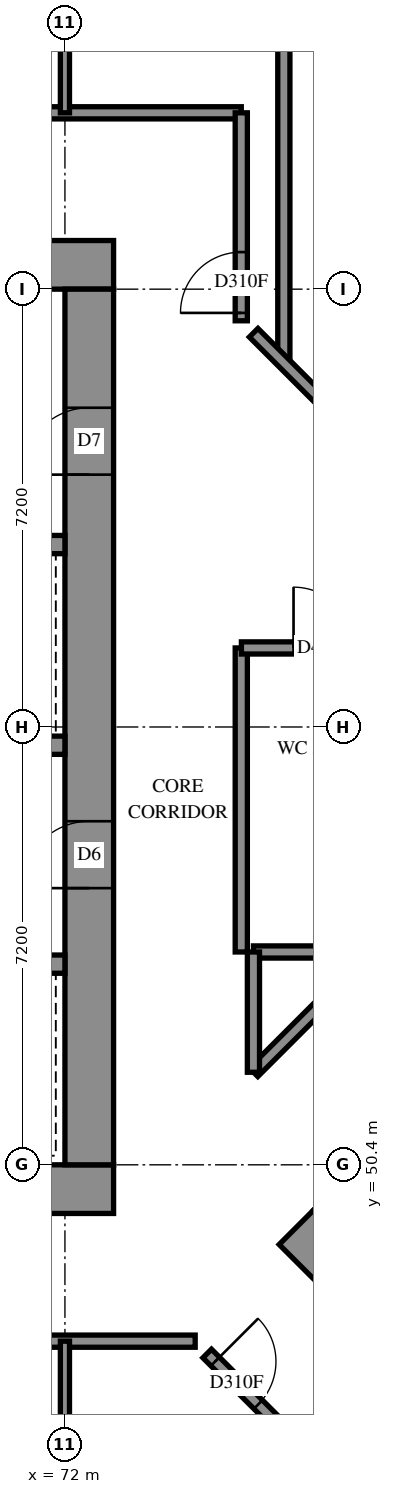
"""IFC4 building model, lengths in metres.
Left out: names, types, materials, properties, quantities, classifications, styles, units other than length and angle.
Written with IfcOpenShell. Run it as: python <this file> out.ifc"""

import sys

from ifc_helpers import new_model, si_unit, direction, frame, frame_2d, origin, place, context, subcontext, project, spatial, rectangle, extrude, element, fill, save


model = new_model("IFC4")
c1 = context("Model", 3, precision=1e-05, world=origin(), true_north=direction((0.0, 1.0)))
c2 = subcontext(c1, "Body", "Model", "MODEL_VIEW")
j1 = project(units=[si_unit("LENGTHUNIT", "METRE"), si_unit("PLANEANGLEUNIT", "RADIAN")], contexts=[c1])
p1 = place(None, origin())
s1 = spatial("IfcSite", under=j1, at=p1, CompositionType="ELEMENT")
p2 = place(p1, origin())
s2 = spatial("IfcBuilding", under=s1, at=p2, CompositionType="ELEMENT")
p3 = place(p2, frame((0.0, 0.0, 111.8)))
s3 = spatial("IfcBuildingStorey", under=s2, at=p3, CompositionType="ELEMENT", Elevation=111.8)
p4 = place(p3, frame((56.8, 50.0, -0.3), z_axis=(0.0, 0.0, 1.0), x_axis=(1.0, 0.0, 0.0)))
e1 = element("IfcWall", 1, at=p4, inside=s3, PredefinedType="SHEAR", context=c2, shape_type="SweptSolid", body=[
    extrude(rectangle(XDim=16.0, YDim=0.8, at=frame_2d((8.0, 0.0))), origin(), (0.0, 0.0, 1.0), 2.7),
])
p5 = place(p3, frame((56.8, 65.2, -0.3), z_axis=(0.0, 0.0, 1.0), x_axis=(1.0, 0.0, 0.0)))
e2 = element("IfcWall", 2, at=p5, inside=s3, PredefinedType="SHEAR", context=c2, shape_type="SweptSolid", body=[
    extrude(rectangle(XDim=16.0, YDim=0.8, at=frame_2d((8.0, 0.0))), origin(), (0.0, 0.0, 1.0), 2.7),
])
p6 = place(p5, frame((10.8, 0.0, 0.3)))
e3 = element("IfcOpeningElement", 3, at=p6, cuts=e2, PredefinedType="OPENING", context=c2, shape_type="SweptSolid", body=[
    extrude(rectangle(XDim=0.8, YDim=2.1, at=frame_2d((0.4, 1.05))), frame((0.0, 0.41, 0.0), z_axis=(0.0, -1.0, 0.0), x_axis=(1.0, 0.0, 0.0)), (0.0, 0.0, 1.0), 0.82),
])
p7 = place(p3, frame((72.4, 50.4, -0.3), z_axis=(0.0, 0.0, 1.0), x_axis=(0.0, 1.0, 0.0)))
e4 = element("IfcWall", 4, at=p7, inside=s3, PredefinedType="SHEAR", context=c2, shape_type="SweptSolid", body=[
    extrude(rectangle(XDim=14.4, YDim=0.8, at=frame_2d((7.2, 0.0))), origin(), (0.0, 0.0, 1.0), 2.7),
])
p8 = place(p7, frame((4.55, 0.0, 0.3)))
e5 = element("IfcOpeningElement", 5, at=p8, cuts=e4, PredefinedType="OPENING", context=c2, shape_type="SweptSolid", body=[
    extrude(rectangle(XDim=1.1, YDim=2.1, at=frame_2d((0.55, 1.05))), frame((0.0, 0.41, 0.0), z_axis=(0.0, -1.0, 0.0), x_axis=(1.0, 0.0, 0.0)), (0.0, 0.0, 1.0), 0.82),
])
p9 = place(p7, frame((11.35, 0.0, 0.3)))
e6 = element("IfcOpeningElement", 6, at=p9, cuts=e4, PredefinedType="OPENING", context=c2, shape_type="SweptSolid", body=[
    extrude(rectangle(XDim=1.1, YDim=2.1, at=frame_2d((0.55, 1.05))), frame((0.0, 0.41, 0.0), z_axis=(0.0, -1.0, 0.0), x_axis=(1.0, 0.0, 0.0)), (0.0, 0.0, 1.0), 0.82),
])
p10 = place(p3, frame((57.6, 53.7, 0.0), z_axis=(0.0, 0.0, 1.0), x_axis=(1.0, 0.0, 0.0)))
e7 = element("IfcWall", 7, at=p10, inside=s3, PredefinedType="SOLIDWALL", context=c2, shape_type="SweptSolid", body=[
    extrude(rectangle(XDim=14.4, YDim=0.3, at=frame_2d((7.2, 0.0))), origin(), (0.0, 0.0, 1.0), 3.1),
])
p11 = place(p10, frame((1.25, 0.0, 0.0)))
e8 = element("IfcOpeningElement", 8, at=p11, cuts=e7, PredefinedType="OPENING", context=c2, shape_type="SweptSolid", body=[
    extrude(rectangle(XDim=1.1, YDim=2.1, at=frame_2d((0.55, 1.05))), frame((0.0, 0.16, 0.0), z_axis=(0.0, -1.0, 0.0), x_axis=(1.0, 0.0, 0.0)), (0.0, 0.0, 1.0), 0.32),
])
p12 = place(p10, frame((4.85, 0.0, 0.0)))
e9 = element("IfcOpeningElement", 9, at=p12, cuts=e7, PredefinedType="OPENING", context=c2, shape_type="SweptSolid", body=[
    extrude(rectangle(XDim=1.1, YDim=2.1, at=frame_2d((0.55, 1.05))), frame((0.0, 0.16, 0.0), z_axis=(0.0, -1.0, 0.0), x_axis=(1.0, 0.0, 0.0)), (0.0, 0.0, 1.0), 0.32),
])
p13 = place(p10, frame((8.45, 0.0, 0.0)))
e10 = element("IfcOpeningElement", 10, at=p13, cuts=e7, PredefinedType="OPENING", context=c2, shape_type="SweptSolid", body=[
    extrude(rectangle(XDim=1.1, YDim=2.1, at=frame_2d((0.55, 1.05))), frame((0.0, 0.16, 0.0), z_axis=(0.0, -1.0, 0.0), x_axis=(1.0, 0.0, 0.0)), (0.0, 0.0, 1.0), 0.32),
])
p14 = place(p10, frame((12.05, 0.0, 0.0)))
e11 = element("IfcOpeningElement", 11, at=p14, cuts=e7, PredefinedType="OPENING", context=c2, shape_type="SweptSolid", body=[
    extrude(rectangle(XDim=1.1, YDim=2.1, at=frame_2d((0.55, 1.05))), frame((0.0, 0.16, 0.0), z_axis=(0.0, -1.0, 0.0), x_axis=(1.0, 0.0, 0.0)), (0.0, 0.0, 1.0), 0.32),
])
p15 = place(p3, frame((57.6, 57.3, 0.0), z_axis=(0.0, 0.0, 1.0), x_axis=(1.0, 0.0, 0.0)))
e12 = element("IfcWall", 12, at=p15, inside=s3, PredefinedType="SOLIDWALL", context=c2, shape_type="SweptSolid", body=[
    extrude(rectangle(XDim=14.4, YDim=0.3, at=frame_2d((7.2, 0.0))), origin(), (0.0, 0.0, 1.0), 3.1),
])
p16 = place(p15, frame((12.05, 0.0, 0.0)))
e13 = element("IfcOpeningElement", 13, at=p16, cuts=e12, PredefinedType="OPENING", context=c2, shape_type="SweptSolid", body=[
    extrude(rectangle(XDim=1.1, YDim=2.1, at=frame_2d((0.55, 1.05))), frame((0.0, 0.16, 0.0), z_axis=(0.0, -1.0, 0.0), x_axis=(1.0, 0.0, 0.0)), (0.0, 0.0, 1.0), 0.32),
])
p17 = place(p3, frame((64.8, 60.6, 0.0), z_axis=(0.0, 0.0, 1.0), x_axis=(1.0, 0.0, 0.0)))
e14 = element("IfcWall", 14, at=p17, inside=s3, PredefinedType="SOLIDWALL", context=c2, shape_type="SweptSolid", body=[
    extrude(rectangle(XDim=7.2, YDim=0.3, at=frame_2d((3.6, 0.0))), origin(), (0.0, 0.0, 1.0), 3.1),
])
p18 = place(p3, frame((75.806, 49.373, -0.3), z_axis=(0.0, 0.0, 1.0), x_axis=(0.7071067812, -0.7071067812, 0.0)))
e15 = element("IfcWall", 15, at=p18, inside=s3, PredefinedType="SHEAR", context=c2, shape_type="SweptSolid", body=[
    extrude(rectangle(XDim=16.0, YDim=0.8, at=frame_2d((8.0, 0.0))), origin(), (0.0, 0.0, 1.0), 2.7),
])
p19 = place(p3, frame((76.372, 49.373, -0.3), z_axis=(0.0, 0.0, 1.0), x_axis=(0.7071067812, 0.7071067812, 0.0)))
e16 = element("IfcWall", 16, at=p19, inside=s3, PredefinedType="SHEAR", context=c2, shape_type="SweptSolid", body=[
    extrude(rectangle(XDim=14.4, YDim=0.8, at=frame_2d((7.2, 0.0))), origin(), (0.0, 0.0, 1.0), 2.7),
])
p20 = place(p19, frame((4.55, 0.0, 0.3)))
e17 = element("IfcOpeningElement", 17, at=p20, cuts=e16, PredefinedType="OPENING", context=c2, shape_type="SweptSolid", body=[
    extrude(rectangle(XDim=1.1, YDim=2.1, at=frame_2d((0.55, 1.05))), frame((0.0, 0.41, 0.0), z_axis=(0.0, -1.0, 0.0), x_axis=(1.0, 0.0, 0.0)), (0.0, 0.0, 1.0), 0.82),
])
p21 = place(p19, frame((11.35, 0.0, 0.3)))
e18 = element("IfcOpeningElement", 18, at=p21, cuts=e16, PredefinedType="OPENING", context=c2, shape_type="SweptSolid", body=[
    extrude(rectangle(XDim=1.1, YDim=2.1, at=frame_2d((0.55, 1.05))), frame((0.0, 0.41, 0.0), z_axis=(0.0, -1.0, 0.0), x_axis=(1.0, 0.0, 0.0)), (0.0, 0.0, 1.0), 0.82),
])
p22 = place(p3, frame((54.7, 67.7, 0.0), z_axis=(0.0, 0.0, 1.0), x_axis=(1.0, 0.0, 0.0)))
e19 = element("IfcWall", 19, at=p22, inside=s3, PredefinedType="PARTITIONING", context=c2, shape_type="SweptSolid", body=[
    extrude(rectangle(XDim=20.2, YDim=0.2, at=frame_2d((10.1, 0.0))), origin(), (0.0, 0.0, 1.0), 3.1),
])
p23 = place(p22, frame((5.2, 0.0, 0.0)))
e20 = element("IfcOpeningElement", 20, at=p23, cuts=e19, PredefinedType="OPENING", context=c2, shape_type="SweptSolid", body=[
    extrude(rectangle(XDim=0.9, YDim=2.1, at=frame_2d((0.45, 1.05))), frame((0.0, 0.11, 0.0), z_axis=(0.0, -1.0, 0.0), x_axis=(1.0, 0.0, 0.0)), (0.0, 0.0, 1.0), 0.22),
])
p24 = place(p22, frame((8.838, 0.0, 0.0)))
e21 = element("IfcOpeningElement", 21, at=p24, cuts=e19, PredefinedType="OPENING", context=c2, shape_type="SweptSolid", body=[
    extrude(rectangle(XDim=1.0, YDim=2.1, at=frame_2d((0.5, 1.05))), frame((0.0, 0.11, 0.0), z_axis=(0.0, -1.0, 0.0), x_axis=(1.0, 0.0, 0.0)), (0.0, 0.0, 1.0), 0.22),
])
p25 = place(p22, frame((14.1, 0.0, 0.0)))
e22 = element("IfcOpeningElement", 22, at=p25, cuts=e19, PredefinedType="OPENING", context=c2, shape_type="SweptSolid", body=[
    extrude(rectangle(XDim=0.9, YDim=2.1, at=frame_2d((0.45, 1.05))), frame((0.0, 0.11, 0.0), z_axis=(0.0, -1.0, 0.0), x_axis=(1.0, 0.0, 0.0)), (0.0, 0.0, 1.0), 0.22),
])
p26 = place(p3, frame((54.7, 47.5, 0.0), z_axis=(0.0, 0.0, 1.0), x_axis=(1.0, 0.0, 0.0)))
e23 = element("IfcWall", 23, at=p26, inside=s3, PredefinedType="PARTITIONING", context=c2, shape_type="SweptSolid", body=[
    extrude(rectangle(XDim=19.442, YDim=0.2, at=frame_2d((9.721, 0.0))), origin(), (0.0, 0.0, 1.0), 3.1),
])
p27 = place(p26, frame((5.2, 0.0, 0.0)))
e24 = element("IfcOpeningElement", 24, at=p27, cuts=e23, PredefinedType="OPENING", context=c2, shape_type="SweptSolid", body=[
    extrude(rectangle(XDim=0.9, YDim=2.1, at=frame_2d((0.45, 1.05))), frame((0.0, 0.11, 0.0), z_axis=(0.0, -1.0, 0.0), x_axis=(1.0, 0.0, 0.0)), (0.0, 0.0, 1.0), 0.22),
])
p28 = place(p26, frame((8.757, 0.0, 0.0)))
e25 = element("IfcOpeningElement", 25, at=p28, cuts=e23, PredefinedType="OPENING", context=c2, shape_type="SweptSolid", body=[
    extrude(rectangle(XDim=0.9, YDim=2.1, at=frame_2d((0.45, 1.05))), frame((0.0, 0.11, 0.0), z_axis=(0.0, -1.0, 0.0), x_axis=(1.0, 0.0, 0.0)), (0.0, 0.0, 1.0), 0.22),
])
p29 = place(p26, frame((14.05, 0.0, 0.0)))
e26 = element("IfcOpeningElement", 26, at=p29, cuts=e23, PredefinedType="OPENING", context=c2, shape_type="SweptSolid", body=[
    extrude(rectangle(XDim=0.9, YDim=2.1, at=frame_2d((0.45, 1.05))), frame((0.0, 0.11, 0.0), z_axis=(0.0, -1.0, 0.0), x_axis=(1.0, 0.0, 0.0)), (0.0, 0.0, 1.0), 0.22),
])
p30 = place(p3, frame((75.6, 63.58, 0.0), z_axis=(0.0, 0.0, 1.0), x_axis=(0.0, 1.0, 0.0)))
e27 = element("IfcWall", 27, at=p30, inside=s3, PredefinedType="PARTITIONING", context=c2, shape_type="SweptSolid", body=[
    extrude(rectangle(XDim=9.18, YDim=0.2, at=frame_2d((4.59, 0.0))), origin(), (0.0, 0.0, 1.0), 3.1),
])
p31 = place(p3, frame((74.9, 53.9, 0.0), z_axis=(0.0, 0.0, 1.0), x_axis=(0.0, 1.0, 0.0)))
e28 = element("IfcWall", 28, at=p31, inside=s3, PredefinedType="PARTITIONING", context=c2, shape_type="SweptSolid", body=[
    extrude(rectangle(XDim=5.0, YDim=0.2, at=frame_2d((2.5, 0.0))), origin(), (0.0, 0.0, 1.0), 3.1),
])
p32 = place(p3, frame((75.103, 64.083, 0.0), z_axis=(0.0, 0.0, 1.0), x_axis=(0.7071067812, -0.7071067812, 0.0)))
e29 = element("IfcWall", 29, at=p32, inside=s3, PredefinedType="PARTITIONING", context=c2, shape_type="SweptSolid", body=[
    extrude(rectangle(XDim=4.214, YDim=0.2, at=frame_2d((2.107, 0.0))), origin(), (0.0, 0.0, 1.0), 3.1),
])
p33 = place(p32, frame((2.979, 0.0, 0.0)))
e30 = element("IfcOpeningElement", 30, at=p33, cuts=e29, PredefinedType="OPENING", context=c2, shape_type="SweptSolid", body=[
    extrude(rectangle(XDim=1.0, YDim=2.1, at=frame_2d((0.5, 1.05))), frame((0.0, 0.11, 0.0), z_axis=(0.0, -1.0, 0.0), x_axis=(1.0, 0.0, 0.0)), (0.0, 0.0, 1.0), 0.22),
])
p34 = place(p3, frame((74.9, 64.28, 0.0), z_axis=(0.0, 0.0, 1.0), x_axis=(0.0, 1.0, 0.0)))
e31 = element("IfcWall", 31, at=p34, inside=s3, PredefinedType="PARTITIONING", context=c2, shape_type="SweptSolid", body=[
    extrude(rectangle(XDim=3.42, YDim=0.2, at=frame_2d((1.71, 0.0))), origin(), (0.0, 0.0, 1.0), 3.1),
])
p35 = place(p34, frame((0.13, 0.0, 0.0)))
e32 = element("IfcOpeningElement", 32, at=p35, cuts=e31, PredefinedType="OPENING", context=c2, shape_type="SweptSolid", body=[
    extrude(rectangle(XDim=1.0, YDim=2.1, at=frame_2d((0.5, 1.05))), frame((0.0, 0.11, 0.0), z_axis=(0.0, -1.0, 0.0), x_axis=(1.0, 0.0, 0.0)), (0.0, 0.0, 1.0), 0.22),
])
p36 = place(p3, frame((75.102, 51.922, 0.0), z_axis=(0.0, 0.0, 1.0), x_axis=(0.7071067812, 0.7071067812, 0.0)))
e33 = element("IfcWall", 33, at=p36, inside=s3, PredefinedType="PARTITIONING", context=c2, shape_type="SweptSolid", body=[
    extrude(rectangle(XDim=2.797, YDim=0.2, at=frame_2d((1.399, 0.0))), origin(), (0.0, 0.0, 1.0), 3.1),
])
for number, where, z_axis, x_axis in (
    (34, (72.0, 45.1, 0.0), (0.0, 0.0, 1.0), (0.0, 1.0, 0.0)),
    (35, (72.0, 67.7, 0.0), (0.0, 0.0, 1.0), (0.0, 1.0, 0.0)),
):
    element("IfcWall", number, at=place(p3, frame(where, z_axis=z_axis, x_axis=x_axis)), inside=s3, PredefinedType="PARTITIONING", context=c2, shape_type="SweptSolid", body=[
        extrude(rectangle(XDim=2.4, YDim=0.15, at=frame_2d((1.2, 0.0))), origin(), (0.0, 0.0, 1.0), 3.1),
    ])
p37 = place(p3, frame((74.902, 58.9, 0.0), z_axis=(0.0, 0.0, 1.0), x_axis=(1.0, 0.0, 0.0)))
e36 = element("IfcWall", 36, at=p37, inside=s3, PredefinedType="PARTITIONING", context=c2, shape_type="SweptSolid", body=[
    extrude(rectangle(XDim=2.266, YDim=0.2, at=frame_2d((1.133, 0.0))), origin(), (0.0, 0.0, 1.0), 3.1),
])
p38 = place(p37, frame((0.858, 0.0, 0.0)))
e37 = element("IfcOpeningElement", 37, at=p38, cuts=e36, PredefinedType="OPENING", context=c2, shape_type="SweptSolid", body=[
    extrude(rectangle(XDim=1.0, YDim=2.1, at=frame_2d((0.5, 1.05))), frame((0.0, 0.11, 0.0), z_axis=(0.0, -1.0, 0.0), x_axis=(1.0, 0.0, 0.0)), (0.0, 0.0, 1.0), 0.22),
])
p39 = place(p3, frame((75.1, 53.9, 0.0), z_axis=(0.0, 0.0, 1.0), x_axis=(1.0, 0.0, 0.0)))
e38 = element("IfcWall", 38, at=p39, inside=s3, PredefinedType="PARTITIONING", context=c2, shape_type="SweptSolid", body=[
    extrude(rectangle(XDim=1.98, YDim=0.2, at=frame_2d((0.99, 0.0))), origin(), (0.0, 0.0, 1.0), 3.1),
])
p40 = place(p3, frame((75.1, 51.922, 0.0), z_axis=(0.0, 0.0, 1.0), x_axis=(0.0, 1.0, 0.0)))
e39 = element("IfcWall", 39, at=p40, inside=s3, PredefinedType="PARTITIONING", context=c2, shape_type="SweptSolid", body=[
    extrude(rectangle(XDim=1.978, YDim=0.2, at=frame_2d((0.989, 0.0))), origin(), (0.0, 0.0, 1.0), 3.1),
])
p41 = place(p3, frame((74.339, 47.297, 0.0), z_axis=(0.0, 0.0, 1.0), x_axis=(0.7071067812, -0.7071067812, 0.0)))
e40 = element("IfcWall", 40, at=p41, inside=s3, PredefinedType="PARTITIONING", context=c2, shape_type="SweptSolid", body=[
    extrude(rectangle(XDim=1.779, YDim=0.2, at=frame_2d((0.889, 0.0))), origin(), (0.0, 0.0, 1.0), 3.1),
])
p42 = place(p41, frame((0.186, 0.0, 0.0)))
e41 = element("IfcOpeningElement", 41, at=p42, cuts=e40, PredefinedType="OPENING", context=c2, shape_type="SweptSolid", body=[
    extrude(rectangle(XDim=1.0, YDim=2.1, at=frame_2d((0.5, 1.05))), frame((0.0, 0.11, 0.0), z_axis=(0.0, -1.0, 0.0), x_axis=(1.0, 0.0, 0.0)), (0.0, 0.0, 1.0), 0.22),
])
p43 = place(p8, origin())
e42 = element("IfcDoor", 42, at=p43, inside=s3, OperationType="DOUBLE_DOOR_SINGLE_SWING", PredefinedType="DOOR", context=c2, shape_type="SweptSolid", body=[
    extrude(rectangle(XDim=1.1, YDim=2.1, at=frame_2d((0.55, 1.05))), frame((0.0, 0.025, 0.0), z_axis=(0.0, -1.0, 0.0), x_axis=(1.0, 0.0, 0.0)), (0.0, 0.0, 1.0), 0.05),
])
fill(e5, e42)
p44 = place(p9, origin())
e43 = element("IfcDoor", 43, at=p44, inside=s3, OperationType="SINGLE_SWING_RIGHT", PredefinedType="DOOR", context=c2, shape_type="SweptSolid", body=[
    extrude(rectangle(XDim=1.1, YDim=2.1, at=frame_2d((0.55, 1.05))), frame((0.0, 0.025, 0.0), z_axis=(0.0, -1.0, 0.0), x_axis=(1.0, 0.0, 0.0)), (0.0, 0.0, 1.0), 0.05),
])
fill(e6, e43)
p45 = place(p38, origin())
e44 = element("IfcDoor", 44, at=p45, inside=s3, OperationType="SINGLE_SWING_RIGHT", PredefinedType="DOOR", context=c2, shape_type="SweptSolid", body=[
    extrude(rectangle(XDim=1.0, YDim=2.1, at=frame_2d((0.5, 1.05))), frame((0.0, 0.025, 0.0), z_axis=(0.0, -1.0, 0.0), x_axis=(1.0, 0.0, 0.0)), (0.0, 0.0, 1.0), 0.05),
])
fill(e37, e44)
p46 = place(p42, origin())
e45 = element("IfcDoor", 45, at=p46, inside=s3, OperationType="SINGLE_SWING_LEFT", PredefinedType="DOOR", context=c2, shape_type="SweptSolid", body=[
    extrude(rectangle(XDim=1.0, YDim=2.1, at=frame_2d((0.5, 1.05))), frame((0.0, 0.025, 0.0), z_axis=(0.0, -1.0, 0.0), x_axis=(1.0, 0.0, 0.0)), (0.0, 0.0, 1.0), 0.05),
])
fill(e41, e45)
p47 = place(p35, origin())
e46 = element("IfcDoor", 46, at=p47, inside=s3, OperationType="SINGLE_SWING_RIGHT", PredefinedType="DOOR", context=c2, shape_type="SweptSolid", body=[
    extrude(rectangle(XDim=1.0, YDim=2.1, at=frame_2d((0.5, 1.05))), frame((0.0, 0.025, 0.0), z_axis=(0.0, -1.0, 0.0), x_axis=(1.0, 0.0, 0.0)), (0.0, 0.0, 1.0), 0.05),
])
fill(e32, e46)
save(model, sys.argv[1])
